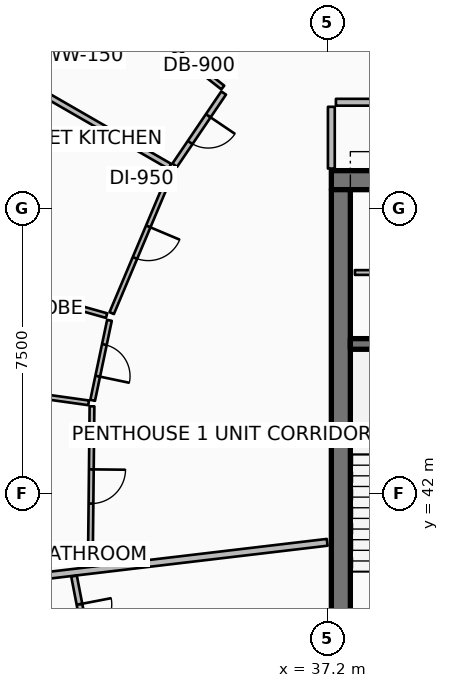
"""IFC4 building model, lengths in metres.
Left out: names, types, materials, properties, quantities, classifications, styles, units other than length and angle.
Written with IfcOpenShell. Run it as: python <this file> out.ifc"""

import sys

from ifc_helpers import new_model, si_unit, direction, frame, frame_2d, origin, place, context, subcontext, project, spatial, rectangle, extrude, element, fill, save


model = new_model("IFC4")
c1 = context("Model", 3, precision=1e-05, world=origin(), true_north=direction((0.0, 1.0)))
c2 = subcontext(c1, "Body", "Model", "MODEL_VIEW")
j1 = project(units=[si_unit("LENGTHUNIT", "METRE"), si_unit("PLANEANGLEUNIT", "RADIAN")], contexts=[c1])
p1 = place(None, origin())
s1 = spatial("IfcSite", under=j1, at=p1, CompositionType="ELEMENT")
p2 = place(p1, origin())
s2 = spatial("IfcBuilding", under=s1, at=p2, CompositionType="ELEMENT")
p3 = place(p2, frame((0.0, 0.0, 338.9)))
s3 = spatial("IfcBuildingStorey", under=s2, at=p3, CompositionType="ELEMENT", Elevation=338.9)
p4 = place(p3, frame((37.3, 50.25, 0.0), z_axis=(0.0, 0.0, 1.0), x_axis=(1.0, 0.0, 0.0)))
e1 = element("IfcWall", 1, at=p4, inside=s3, PredefinedType="SHEAR", context=c2, shape_type="SweptSolid", body=[
    extrude(rectangle(XDim=9.6, YDim=0.5, at=frame_2d((4.8, 0.0))), origin(), (0.0, 0.0, 1.0), 4.2),
])
p5 = place(p3, frame((37.55, 34.0, 0.0), z_axis=(0.0, 0.0, 1.0), x_axis=(0.0, 1.0, 0.0)))
e2 = element("IfcWall", 2, at=p5, inside=s3, PredefinedType="SHEAR", context=c2, shape_type="SweptSolid", body=[
    extrude(rectangle(XDim=16.0, YDim=0.5, at=frame_2d((8.0, 0.0))), origin(), (0.0, 0.0, 1.0), 4.2),
])
p6 = place(p3, frame((37.8, 45.94, 0.0), z_axis=(0.0, 0.0, 1.0), x_axis=(1.0, 0.0, 0.0)))
e3 = element("IfcWall", 3, at=p6, inside=s3, PredefinedType="SHEAR", context=c2, shape_type="SweptSolid", body=[
    extrude(rectangle(XDim=3.5, YDim=0.28, at=frame_2d((1.75, 0.0))), origin(), (0.0, 0.0, 1.0), 4.2),
])
p7 = place(p3, frame((29.955, 56.289, 0.0), z_axis=(0.0, 0.0, 1.0), x_axis=(-0.636803612721, -0.771026042897, 0.0)))
e4 = element("IfcWall", 4, at=p7, inside=s3, PredefinedType="SOLIDWALL", context=c2, shape_type="SweptSolid", body=[
    extrude(rectangle(XDim=9.728, YDim=0.24, at=frame_2d((4.864, 0.0))), origin(), (0.0, 0.0, 1.0), 2.75),
])
p8 = place(p7, frame((7.508, 0.0, 0.0)))
e5 = element("IfcOpeningElement", 5, at=p8, cuts=e4, PredefinedType="OPENING", context=c2, shape_type="SweptSolid", body=[
    extrude(rectangle(XDim=1.45, YDim=2.15, at=frame_2d((0.725, 1.075))), frame((0.0, 0.13, 0.0), z_axis=(0.0, -1.0, 0.0), x_axis=(1.0, 0.0, 0.0)), (0.0, 0.0, 1.0), 0.26),
])
p9 = place(p7, frame((0.28, 0.0, 0.65)))
e6 = element("IfcOpeningElement", 6, at=p9, cuts=e4, PredefinedType="OPENING", context=c2, shape_type="SweptSolid", body=[
    extrude(rectangle(XDim=1.6, YDim=1.5, at=frame_2d((0.8, 0.75))), frame((0.0, 0.13, 0.0), z_axis=(0.0, -1.0, 0.0), x_axis=(1.0, 0.0, 0.0)), (0.0, 0.0, 1.0), 0.26),
])
p10 = place(p3, frame((37.92, 47.82, 0.0), z_axis=(0.0, 0.0, 1.0), x_axis=(1.0, 0.0, 0.0)))
e7 = element("IfcWall", 7, at=p10, inside=s3, PredefinedType="PARTITIONING", context=c2, shape_type="SweptSolid", body=[
    extrude(rectangle(XDim=8.78, YDim=0.125, at=frame_2d((4.39, 0.0))), origin(), (0.0, 0.0, 1.0), 3.24),
])
p11 = place(p10, frame((3.965, 0.0, 0.0)))
e8 = element("IfcOpeningElement", 8, at=p11, cuts=e7, PredefinedType="OPENING", context=c2, shape_type="SweptSolid", body=[
    extrude(rectangle(XDim=0.85, YDim=2.06, at=frame_2d((0.425, 1.03))), frame((0.0, 0.073, 0.0), z_axis=(0.0, -1.0, 0.0), x_axis=(1.0, 0.0, 0.0)), (0.0, 0.0, 1.0), 0.145),
])
p12 = place(p3, frame((42.232, 52.3, 0.0), z_axis=(0.0, 0.0, 1.0), x_axis=(-0.488623665245, 0.872494649704, 0.0)))
e9 = element("IfcWall", 9, at=p12, inside=s3, PredefinedType="PARTITIONING", context=c2, shape_type="SweptSolid", body=[
    extrude(rectangle(XDim=9.157, YDim=0.18, at=frame_2d((4.579, 0.0))), origin(), (0.0, 0.0, 1.0), 3.24),
])
p13 = place(p3, frame((37.191, 40.721, 0.0), z_axis=(0.0, 0.0, 1.0), x_axis=(-0.993068548333, -0.117536625409, 0.0)))
e10 = element("IfcWall", 10, at=p13, inside=s3, PredefinedType="PARTITIONING", context=c2, shape_type="SweptSolid", body=[
    extrude(rectangle(XDim=14.951, YDim=0.18, at=frame_2d((7.476, 0.0))), origin(), (0.0, 0.0, 1.0), 3.24),
])
p14 = place(p3, frame((42.112, 52.3, 0.0), z_axis=(0.0, 0.0, 1.0), x_axis=(-1.0, 0.0, 0.0)))
e11 = element("IfcWall", 11, at=p14, inside=s3, PredefinedType="PARTITIONING", context=c2, shape_type="SweptSolid", body=[
    extrude(rectangle(XDim=4.692, YDim=0.18, at=frame_2d((2.346, 0.0))), origin(), (0.0, 0.0, 1.0), 3.24),
])
p15 = place(p14, frame((1.796, 0.0, 0.0)))
e12 = element("IfcOpeningElement", 12, at=p15, cuts=e11, PredefinedType="OPENING", context=c2, shape_type="SweptSolid", body=[
    extrude(rectangle(XDim=1.1, YDim=2.1, at=frame_2d((0.55, 1.05))), frame((0.0, 0.1, 0.0), z_axis=(0.0, -1.0, 0.0), x_axis=(1.0, 0.0, 0.0)), (0.0, 0.0, 1.0), 0.2),
])
p16 = place(p3, frame((37.3, 52.18, 0.0), z_axis=(0.0, 0.0, 1.0), x_axis=(0.0, -1.0, 0.0)))
e13 = element("IfcWall", 13, at=p16, inside=s3, PredefinedType="PARTITIONING", context=c2, shape_type="SweptSolid", body=[
    extrude(rectangle(XDim=1.625, YDim=0.18, at=frame_2d((0.812, 0.0))), origin(), (0.0, 0.0, 1.0), 3.24),
])
p17 = place(p3, frame((34.443, 52.688, 0.0), z_axis=(0.0, 0.0, 1.0), x_axis=(-0.785329715116, 0.61907773224, 0.0)))
e14 = element("IfcWall", 14, at=p17, inside=s3, PredefinedType="PARTITIONING", context=c2, shape_type="SweptSolid", body=[
    extrude(rectangle(XDim=5.73, YDim=0.125, at=frame_2d((2.865, 0.0))), origin(), (0.0, 0.0, 1.0), 3.24),
])
p18 = place(p3, frame((34.466, 52.543, 0.0), z_axis=(0.0, 0.0, 1.0), x_axis=(-0.560627016922, -0.828068443969, 0.0)))
e15 = element("IfcWall", 15, at=p18, inside=s3, PredefinedType="PARTITIONING", context=c2, shape_type="SweptSolid", body=[
    extrude(rectangle(XDim=2.295, YDim=0.15, at=frame_2d((1.147, 0.0))), origin(), (0.0, 0.0, 1.0), 3.24),
])
p19 = place(p18, frame((0.722, 0.0, 0.0)))
e16 = element("IfcOpeningElement", 16, at=p19, cuts=e15, PredefinedType="OPENING", context=c2, shape_type="SweptSolid", body=[
    extrude(rectangle(XDim=0.85, YDim=2.06, at=frame_2d((0.425, 1.03))), frame((0.0, 0.085, 0.0), z_axis=(0.0, -1.0, 0.0), x_axis=(1.0, 0.0, 0.0)), (0.0, 0.0, 1.0), 0.17),
])
p20 = place(p3, frame((31.152, 55.155, 0.0), z_axis=(0.0, 0.0, 1.0), x_axis=(-0.560638207203, -0.828060867705, 0.0)))
e17 = element("IfcWall", 17, at=p20, inside=s3, PredefinedType="PARTITIONING", context=c2, shape_type="SweptSolid", body=[
    extrude(rectangle(XDim=2.906, YDim=0.15, at=frame_2d((1.453, 0.0))), origin(), (0.0, 0.0, 1.0), 3.24),
])
p21 = place(p3, frame((33.051, 50.613, 0.0), z_axis=(0.0, 0.0, 1.0), x_axis=(-0.866485544891, 0.499202163952, 0.0)))
e18 = element("IfcWall", 18, at=p21, inside=s3, PredefinedType="PARTITIONING", context=c2, shape_type="SweptSolid", body=[
    extrude(rectangle(XDim=4.09, YDim=0.15, at=frame_2d((2.045, 0.0))), origin(), (0.0, 0.0, 1.0), 3.24),
])
p22 = place(p3, frame((33.094, 50.485, 0.0), z_axis=(0.0, 0.0, 1.0), x_axis=(-0.388261704365, -0.921549157085, 0.0)))
e19 = element("IfcWall", 19, at=p22, inside=s3, PredefinedType="PARTITIONING", context=c2, shape_type="SweptSolid", body=[
    extrude(rectangle(XDim=4.052, YDim=0.125, at=frame_2d((2.026, 0.0))), origin(), (0.0, 0.0, 1.0), 3.24),
])
p23 = place(p22, frame((1.576, 0.0, 0.0)))
e20 = element("IfcOpeningElement", 20, at=p23, cuts=e19, PredefinedType="OPENING", context=c2, shape_type="SweptSolid", body=[
    extrude(rectangle(XDim=0.9, YDim=2.08, at=frame_2d((0.45, 1.04))), frame((0.0, 0.073, 0.0), z_axis=(0.0, -1.0, 0.0), x_axis=(1.0, 0.0, 0.0)), (0.0, 0.0, 1.0), 0.145),
])
p24 = place(p3, frame((31.385, 46.686, 0.0), z_axis=(0.0, 0.0, 1.0), x_axis=(-0.962455784847, 0.271438505401, 0.0)))
e21 = element("IfcWall", 21, at=p24, inside=s3, PredefinedType="PARTITIONING", context=c2, shape_type="SweptSolid", body=[
    extrude(rectangle(XDim=7.764, YDim=0.125, at=frame_2d((3.882, 0.0))), origin(), (0.0, 0.0, 1.0), 3.24),
])
p25 = place(p3, frame((30.914, 44.391, 0.0), z_axis=(0.0, 0.0, 1.0), x_axis=(-0.990350838179, 0.138582889702, 0.0)))
e22 = element("IfcWall", 22, at=p25, inside=s3, PredefinedType="PARTITIONING", context=c2, shape_type="SweptSolid", body=[
    extrude(rectangle(XDim=7.889, YDim=0.125, at=frame_2d((3.944, 0.0))), origin(), (0.0, 0.0, 1.0), 3.24),
])
p26 = place(p3, frame((31.461, 46.561, 0.0), z_axis=(0.0, 0.0, 1.0), x_axis=(-0.205518321788, -0.978653268226, 0.0)))
e23 = element("IfcWall", 23, at=p26, inside=s3, PredefinedType="PARTITIONING", context=c2, shape_type="SweptSolid", body=[
    extrude(rectangle(XDim=2.15, YDim=0.125, at=frame_2d((1.075, 0.0))), origin(), (0.0, 0.0, 1.0), 3.24),
])
p27 = place(p26, frame((0.65, 0.0, 0.0)))
e24 = element("IfcOpeningElement", 24, at=p27, cuts=e23, PredefinedType="OPENING", context=c2, shape_type="SweptSolid", body=[
    extrude(rectangle(XDim=0.85, YDim=2.06, at=frame_2d((0.425, 1.03))), frame((0.0, 0.073, 0.0), z_axis=(0.0, -1.0, 0.0), x_axis=(1.0, 0.0, 0.0)), (0.0, 0.0, 1.0), 0.145),
])
p28 = place(p3, frame((31.002, 44.298, 0.0), z_axis=(0.0, 0.0, 1.0), x_axis=(-0.010598269554, -0.999943836764, 0.0)))
e25 = element("IfcWall", 25, at=p28, inside=s3, PredefinedType="PARTITIONING", context=c2, shape_type="SweptSolid", body=[
    extrude(rectangle(XDim=4.216, YDim=0.125, at=frame_2d((2.108, 0.0))), origin(), (0.0, 0.0, 1.0), 3.24),
])
p29 = place(p28, frame((1.658, 0.0, 0.0)))
e26 = element("IfcOpeningElement", 26, at=p29, cuts=e25, PredefinedType="OPENING", context=c2, shape_type="SweptSolid", body=[
    extrude(rectangle(XDim=0.9, YDim=2.08, at=frame_2d((0.45, 1.04))), frame((0.0, 0.073, 0.0), z_axis=(0.0, -1.0, 0.0), x_axis=(1.0, 0.0, 0.0)), (0.0, 0.0, 1.0), 0.145),
])
p30 = place(p3, frame((30.529, 39.832, 0.0), z_axis=(0.0, 0.0, 1.0), x_axis=(0.189108301743, -0.981956236404, 0.0)))
e27 = element("IfcWall", 27, at=p30, inside=s3, PredefinedType="PARTITIONING", context=c2, shape_type="SweptSolid", body=[
    extrude(rectangle(XDim=2.36, YDim=0.15, at=frame_2d((1.18, 0.0))), origin(), (0.0, 0.0, 1.0), 3.24),
])
p31 = place(p30, frame((0.755, 0.0, 0.0)))
e28 = element("IfcOpeningElement", 28, at=p31, cuts=e27, PredefinedType="OPENING", context=c2, shape_type="SweptSolid", body=[
    extrude(rectangle(XDim=0.85, YDim=2.06, at=frame_2d((0.425, 1.03))), frame((0.0, 0.085, 0.0), z_axis=(0.0, -1.0, 0.0), x_axis=(1.0, 0.0, 0.0)), (0.0, 0.0, 1.0), 0.17),
])
p32 = place(p19, origin())
e29 = element("IfcDoor", 29, at=p32, inside=s3, OperationType="SINGLE_SWING_LEFT", PredefinedType="DOOR", context=c2, shape_type="SweptSolid", body=[
    extrude(rectangle(XDim=0.85, YDim=2.06, at=frame_2d((0.425, 1.03))), frame((0.0, 0.025, 0.0), z_axis=(0.0, -1.0, 0.0), x_axis=(1.0, 0.0, 0.0)), (0.0, 0.0, 1.0), 0.05),
])
fill(e16, e29)
p33 = place(p23, origin())
e30 = element("IfcDoor", 30, at=p33, inside=s3, OperationType="SINGLE_SWING_LEFT", PredefinedType="DOOR", context=c2, shape_type="SweptSolid", body=[
    extrude(rectangle(XDim=0.9, YDim=2.08, at=frame_2d((0.45, 1.04))), frame((0.0, 0.025, 0.0), z_axis=(0.0, -1.0, 0.0), x_axis=(1.0, 0.0, 0.0)), (0.0, 0.0, 1.0), 0.05),
])
fill(e20, e30)
p34 = place(p27, origin())
e31 = element("IfcDoor", 31, at=p34, inside=s3, OperationType="SINGLE_SWING_RIGHT", PredefinedType="DOOR", context=c2, shape_type="SweptSolid", body=[
    extrude(rectangle(XDim=0.85, YDim=2.06, at=frame_2d((0.425, 1.03))), frame((0.0, 0.025, 0.0), z_axis=(0.0, -1.0, 0.0), x_axis=(1.0, 0.0, 0.0)), (0.0, 0.0, 1.0), 0.05),
])
fill(e24, e31)
p35 = place(p29, origin())
e32 = element("IfcDoor", 32, at=p35, inside=s3, OperationType="SINGLE_SWING_LEFT", PredefinedType="DOOR", context=c2, shape_type="SweptSolid", body=[
    extrude(rectangle(XDim=0.9, YDim=2.08, at=frame_2d((0.45, 1.04))), frame((0.0, 0.025, 0.0), z_axis=(0.0, -1.0, 0.0), x_axis=(1.0, 0.0, 0.0)), (0.0, 0.0, 1.0), 0.05),
])
fill(e26, e32)
p36 = place(p31, origin())
e33 = element("IfcDoor", 33, at=p36, inside=s3, OperationType="SINGLE_SWING_LEFT", PredefinedType="DOOR", context=c2, shape_type="SweptSolid", body=[
    extrude(rectangle(XDim=0.85, YDim=2.06, at=frame_2d((0.425, 1.03))), frame((0.0, 0.025, 0.0), z_axis=(0.0, -1.0, 0.0), x_axis=(1.0, 0.0, 0.0)), (0.0, 0.0, 1.0), 0.05),
])
fill(e28, e33)
save(model, sys.argv[1])
